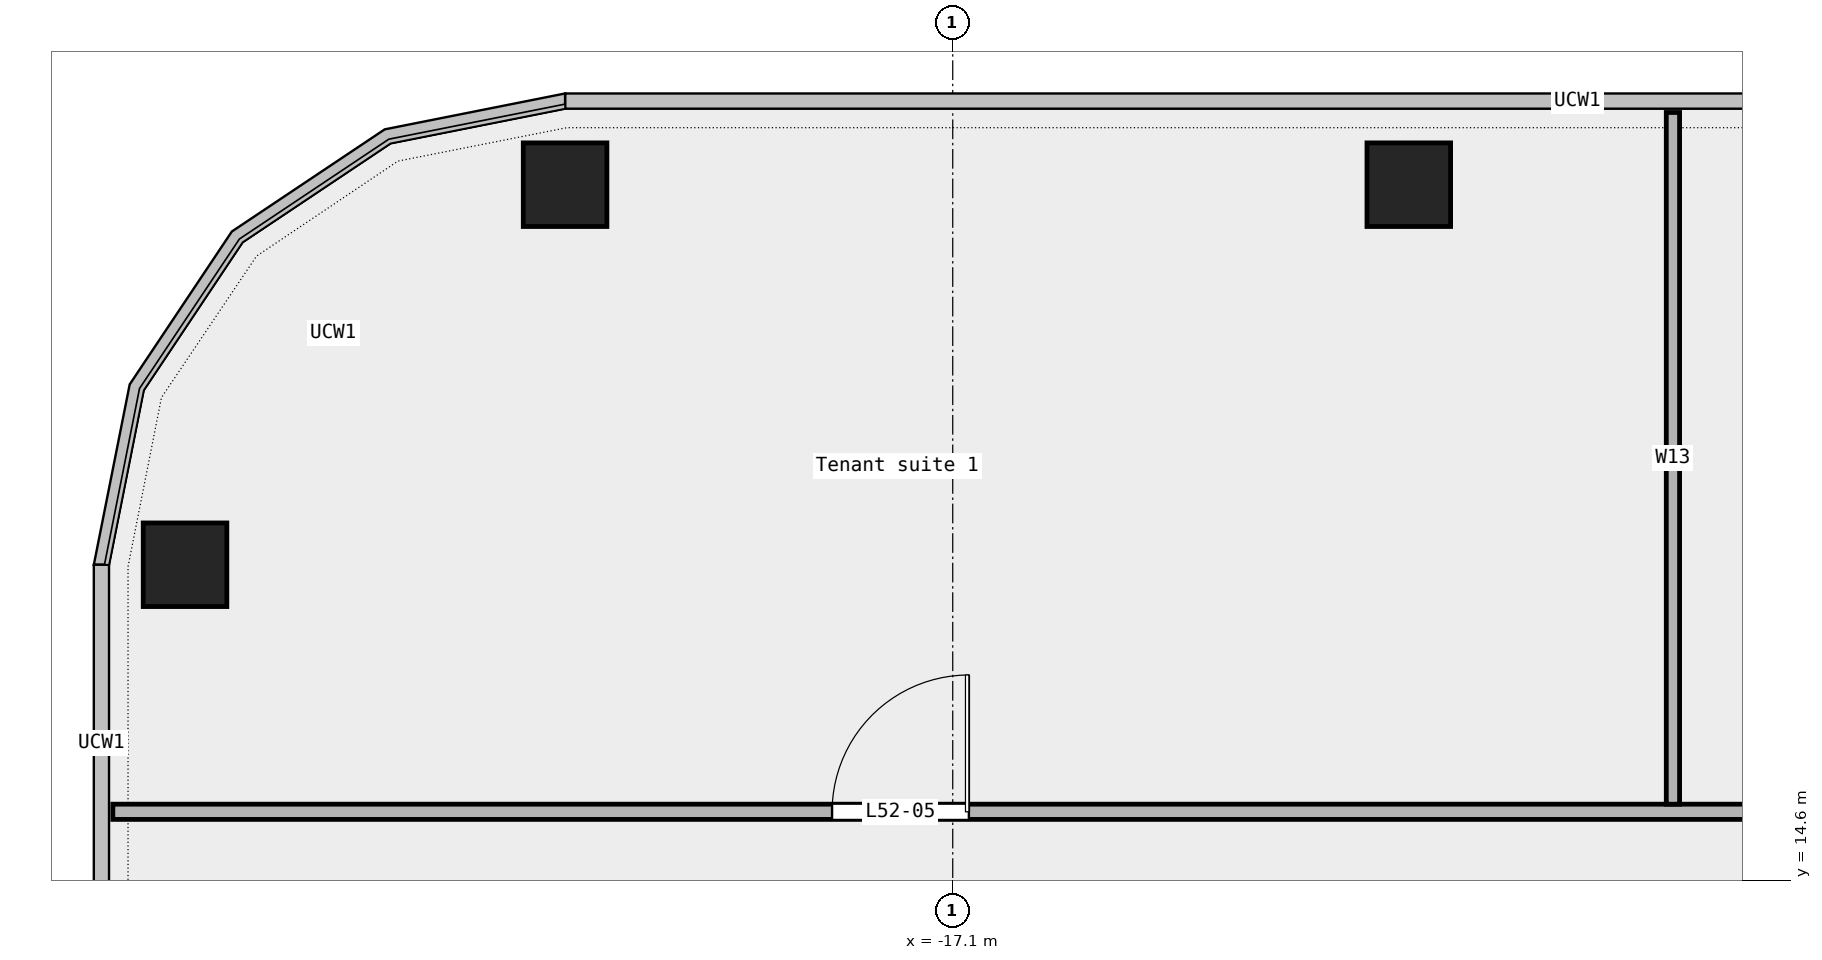
"""IFC4 building model, lengths in metres.
Left out: names, types, materials, properties, quantities, classifications, styles, units other than length and angle.
Written with IfcOpenShell. Run it as: python <this file> out.ifc"""

import sys

from ifc_helpers import new_model, si_unit, direction, frame, frame_2d, origin, origin_2d, place, context, subcontext, project, spatial, rectangle, extrude, element, fill, save


model = new_model("IFC4")
c1 = context("Model", 3, precision=1e-05, world=origin(), true_north=direction((0.0, 1.0)))
c2 = subcontext(c1, "Body", "Model", "MODEL_VIEW")
j1 = project(units=[si_unit("LENGTHUNIT", "METRE"), si_unit("PLANEANGLEUNIT", "RADIAN")], contexts=[c1])
p1 = place(None, origin())
s1 = spatial("IfcSite", under=j1, at=p1, CompositionType="ELEMENT")
p2 = place(p1, origin())
s2 = spatial("IfcBuilding", under=s1, at=p2, CompositionType="ELEMENT")
p3 = place(p2, frame((0.0, 0.0, 243.0)))
s3 = spatial("IfcBuildingStorey", under=s2, at=p3, CompositionType="ELEMENT", Elevation=243.0)
for number, where, z_axis, x_axis in (
    (1, (-11.1, 23.75, 0.0), (0.0, 0.0, 1.0), (1.0, 0.0, 0.0)),
    (2, (-22.2, 23.75, 0.0), (0.0, 0.0, 1.0), (1.0, 0.0, 0.0)),
    (3, (-27.2, 18.75, 0.0), (0.0, 0.0, 1.0), (1.0, 0.0, 0.0)),
):
    element("IfcColumn", number, at=place(p3, frame(where, z_axis=z_axis, x_axis=x_axis)), inside=s3, PredefinedType="COLUMN", context=c2, shape_type="SweptSolid", body=[
        extrude(rectangle(XDim=1.1, YDim=1.1, at=origin_2d()), origin(), (0.0, 0.0, 1.0), 3.6),
    ])
p4 = place(p3, frame((-28.15, 15.5, 0.0), z_axis=(0.0, 0.0, 1.0), x_axis=(1.0, 0.0, 0.0)))
e4 = element("IfcWall", 4, at=p4, inside=s3, PredefinedType="PARTITIONING", context=c2, shape_type="SweptSolid", body=[
    extrude(rectangle(XDim=45.91, YDim=0.2, at=frame_2d((22.955, 0.0))), origin(), (0.0, 0.0, 1.0), 3.6),
])
p5 = place(p4, frame((38.5, 0.0, 0.0)))
e5 = element("IfcOpeningElement", 5, at=p5, cuts=e4, PredefinedType="OPENING", context=c2, shape_type="SweptSolid", body=[
    extrude(rectangle(XDim=1.5, YDim=2.1, at=frame_2d((0.75, 1.05))), frame((0.0, 0.112, 0.0), z_axis=(0.0, -1.0, 0.0), x_axis=(1.0, 0.0, 0.0)), (0.0, 0.0, 1.0), 0.224),
])
p6 = place(p4, frame((9.462, 0.0, 0.0)))
e6 = element("IfcOpeningElement", 6, at=p6, cuts=e4, PredefinedType="OPENING", context=c2, shape_type="SweptSolid", body=[
    extrude(rectangle(XDim=1.8, YDim=2.1, at=frame_2d((0.9, 1.05))), frame((0.0, 0.112, 0.0), z_axis=(0.0, -1.0, 0.0), x_axis=(1.0, 0.0, 0.0)), (0.0, 0.0, 1.0), 0.224),
])
p7 = place(p4, frame((25.808, 0.0, 0.0)))
e7 = element("IfcOpeningElement", 7, at=p7, cuts=e4, PredefinedType="OPENING", context=c2, shape_type="SweptSolid", body=[
    extrude(rectangle(XDim=1.5, YDim=2.1, at=frame_2d((0.75, 1.05))), frame((0.0, 0.112, 0.0), z_axis=(0.0, -1.0, 0.0), x_axis=(1.0, 0.0, 0.0)), (0.0, 0.0, 1.0), 0.224),
])
p8 = place(p3, frame((-7.625, 15.6, 0.0), z_axis=(0.0, 0.0, 1.0), x_axis=(0.0, 1.0, 0.0)))
e8 = element("IfcWall", 8, at=p8, inside=s3, PredefinedType="PARTITIONING", context=c2, shape_type="SweptSolid", body=[
    extrude(rectangle(XDim=9.1, YDim=0.175, at=frame_2d((4.55, 0.0))), origin(), (0.0, 0.0, 1.0), 3.6),
])
p9 = place(p6, origin())
e9 = element("IfcDoor", 9, at=p9, inside=s3, OperationType="DOUBLE_DOOR_SINGLE_SWING", PredefinedType="DOOR", context=c2, shape_type="SweptSolid", body=[
    extrude(rectangle(XDim=1.8, YDim=2.1, at=frame_2d((0.9, 1.05))), frame((0.0, 0.025, 0.0), z_axis=(0.0, -1.0, 0.0), x_axis=(1.0, 0.0, 0.0)), (0.0, 0.0, 1.0), 0.05),
])
fill(e6, e9)
save(model, sys.argv[1])
